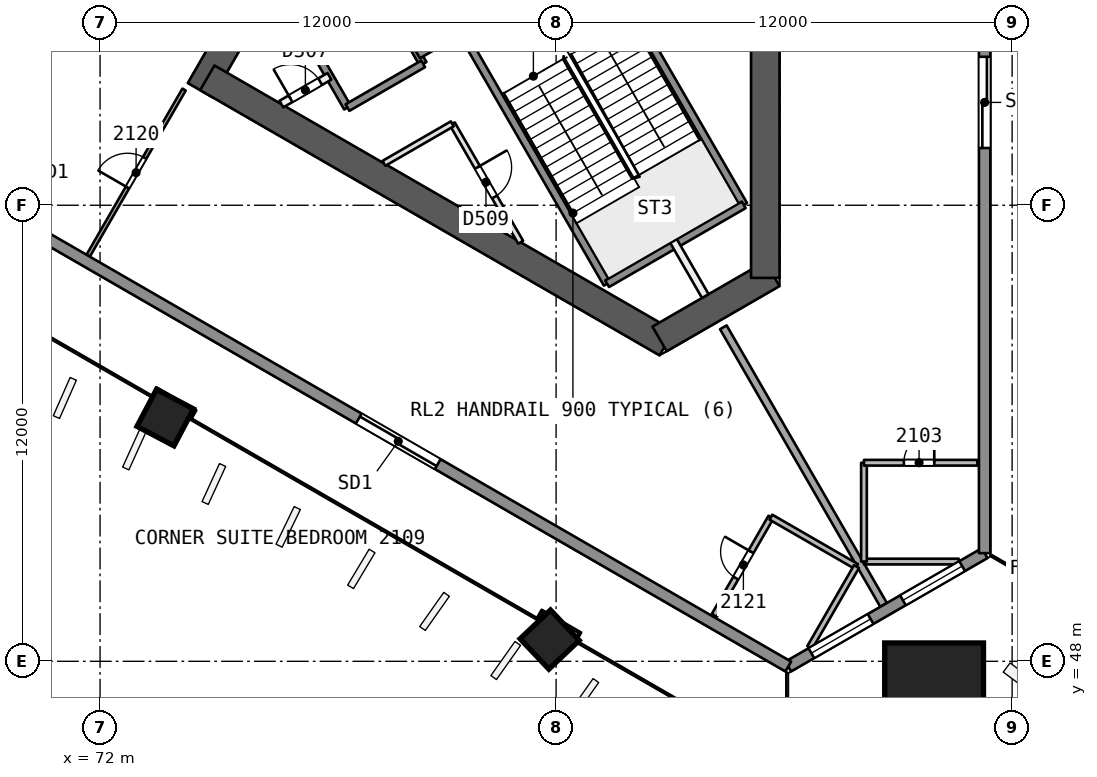
"""IFC4 building model, lengths in metres.
Left out: names, types, materials, properties, quantities, classifications, styles, units other than length and angle.
Written with IfcOpenShell. Run it as: python <this file> out.ifc"""

import sys

from ifc_helpers import new_model, si_unit, direction, frame, frame_2d, origin, origin_2d, place, context, subcontext, project, spatial, rectangle, extrude, element, fill, save


model = new_model("IFC4")
c1 = context("Model", 3, precision=1e-05, world=origin(), true_north=direction((0.0, 1.0)))
c2 = subcontext(c1, "Body", "Model", "MODEL_VIEW")
j1 = project(units=[si_unit("LENGTHUNIT", "METRE"), si_unit("PLANEANGLEUNIT", "RADIAN")], contexts=[c1])
p1 = place(None, origin())
s1 = spatial("IfcSite", under=j1, at=p1, CompositionType="ELEMENT")
p2 = place(p1, origin())
s2 = spatial("IfcBuilding", under=s1, at=p2, CompositionType="ELEMENT")
p3 = place(p2, frame((0.0, 0.0, 90.6)))
s3 = spatial("IfcBuildingStorey", under=s2, at=p3, CompositionType="ELEMENT", Elevation=90.6)
p4 = place(p3, frame((79.717, 71.831, 0.0), z_axis=(0.0, 0.0, 1.0), x_axis=(-0.499996230114, -0.866027580318, 0.0)))
e1 = element("IfcWall", 1, at=p4, inside=s3, PredefinedType="SHEAR", context=c2, shape_type="SweptSolid", body=[
    extrude(rectangle(XDim=10.164, YDim=0.75, at=frame_2d((5.082, 0.0))), origin(), (0.0, 0.0, 1.0), 3.7),
])
p5 = place(p4, frame((0.733, 0.0, 0.0)))
e2 = element("IfcOpeningElement", 2, at=p5, cuts=e1, PredefinedType="OPENING", context=c2, shape_type="SweptSolid", body=[
    extrude(rectangle(XDim=1.2, YDim=2.1, at=frame_2d((0.6, 1.05))), frame((0.0, 0.385, 0.0), z_axis=(0.0, -1.0, 0.0), x_axis=(1.0, 0.0, 0.0)), (0.0, 0.0, 1.0), 0.771),
])
p6 = place(p3, frame((74.822, 63.354, 0.0), z_axis=(0.0, 0.0, 1.0), x_axis=(0.8660248072, -0.500001033313, 0.0)))
e3 = element("IfcWall", 3, at=p6, inside=s3, PredefinedType="SHEAR", context=c2, shape_type="SweptSolid", body=[
    extrude(rectangle(XDim=13.958, YDim=0.75, at=frame_2d((6.979, 0.0))), origin(), (0.0, 0.0, 1.0), 3.7),
])
p7 = place(p3, frame((86.723, 56.483, 0.0), z_axis=(0.0, 0.0, 1.0), x_axis=(0.866017201164, 0.500014207086, 0.0)))
e4 = element("IfcWall", 4, at=p7, inside=s3, PredefinedType="SHEAR", context=c2, shape_type="SweptSolid", body=[
    extrude(rectangle(XDim=3.429, YDim=0.75, at=frame_2d((1.714, 0.0))), origin(), (0.0, 0.0, 1.0), 3.7),
])
p8 = place(p3, frame((89.505, 58.089, 0.0), z_axis=(0.0, 0.0, 1.0), x_axis=(0.0, 1.0, 0.0)))
e5 = element("IfcWall", 5, at=p8, inside=s3, PredefinedType="SHEAR", context=c2, shape_type="SweptSolid", body=[
    extrude(rectangle(XDim=14.117, YDim=0.75, at=frame_2d((7.059, 0.0))), origin(), (0.0, 0.0, 1.0), 3.7),
])
p9 = place(p3, frame((73.714, 54.385, 0.0), z_axis=(0.000857578916, 0.022824792675, 0.999739112668), x_axis=(-0.499949597911, -0.865818985073, 0.020196153983)))
e6 = element("IfcColumn", 6, at=p9, inside=s3, PredefinedType="COLUMN", context=c2, shape_type="SweptSolid", body=[
    extrude(rectangle(XDim=1.1, YDim=1.1, at=origin_2d()), origin(), (0.0, 0.0, 1.0), 3.701),
])
p10 = place(p3, frame((83.841, 48.538, 0.0), z_axis=(-0.008376454378, 0.028163354484, 0.999568237028), x_axis=(-0.500227515951, -0.8656583943, 0.02019843219)))
e7 = element("IfcColumn", 7, at=p10, inside=s3, PredefinedType="COLUMN", context=c2, shape_type="SweptSolid", body=[
    extrude(rectangle(XDim=1.1, YDim=1.1, at=origin_2d()), origin(), (0.0, 0.0, 1.0), 3.702),
])
p11 = place(p3, frame((93.968, 47.146, 0.0), z_axis=(-0.017607037296, 0.030466109479, 0.999380712447), x_axis=(-0.865809063816, -0.500374524745, 1.32655e-07)))
e8 = element("IfcColumn", 8, at=p11, inside=s3, PredefinedType="COLUMN", context=c2, shape_type="SweptSolid", body=[
    extrude(rectangle(XDim=2.6, YDim=2.6, at=origin_2d()), origin(), (0.0, 0.0, 1.0), 3.702),
])
p12 = place(p3, frame((94.595, 50.625, 0.0), z_axis=(0.0, 0.0, 1.0), x_axis=(-1.0, 0.0, 0.0)))
e9 = element("IfcWall", 9, at=p12, inside=s3, PredefinedType="PARTITIONING", context=c2, shape_type="SweptSolid", body=[
    extrude(rectangle(XDim=2.493, YDim=0.15, at=frame_2d((1.247, 0.0))), origin(), (0.0, 0.0, 1.0), 3.2),
])
p13 = place(p3, frame((92.102, 50.625, 0.0), z_axis=(0.0, 0.0, 1.0), x_axis=(0.0, 1.0, 0.0)))
e10 = element("IfcWall", 10, at=p13, inside=s3, PredefinedType="PARTITIONING", context=c2, shape_type="SweptSolid", body=[
    extrude(rectangle(XDim=2.6, YDim=0.15, at=frame_2d((1.3, 0.0))), origin(), (0.0, 0.0, 1.0), 3.2),
])
p14 = place(p3, frame((92.102, 53.225, 0.0), z_axis=(0.0, 0.0, 1.0), x_axis=(1.0, 0.0, 0.0)))
e11 = element("IfcWall", 11, at=p14, inside=s3, PredefinedType="PARTITIONING", context=c2, shape_type="SweptSolid", body=[
    extrude(rectangle(XDim=2.985, YDim=0.15, at=frame_2d((1.493, 0.0))), origin(), (0.0, 0.0, 1.0), 3.2),
])
p15 = place(p14, frame((1.05, 0.0, 0.0)))
e12 = element("IfcOpeningElement", 12, at=p15, cuts=e11, PredefinedType="OPENING", context=c2, shape_type="SweptSolid", body=[
    extrude(rectangle(XDim=0.8, YDim=2.1, at=frame_2d((0.4, 1.05))), frame((0.0, 0.085, 0.0), z_axis=(0.0, -1.0, 0.0), x_axis=(1.0, 0.0, 0.0)), (0.0, 0.0, 1.0), 0.171),
])
p16 = place(p3, frame((88.401, 56.789, 0.0), z_axis=(0.0, 0.0, 1.0), x_axis=(0.500002227119, -0.866024117953, 0.0)))
e13 = element("IfcWall", 13, at=p16, inside=s3, PredefinedType="PARTITIONING", context=c2, shape_type="SweptSolid", body=[
    extrude(rectangle(XDim=8.435, YDim=0.2, at=frame_2d((4.218, 0.0))), origin(), (0.0, 0.0, 1.0), 3.2),
])
for number, where, z_axis, x_axis in (
    (14, (64.936, 62.569, 0.0), (0.0, 0.0, 1.0), (0.5, 0.866, 0.0)),
    (15, (67.636, 61.01, 0.0), (0.0, 0.0, 1.0), (0.5, 0.866, 0.0)),
):
    element("IfcWall", number, at=place(p3, frame(where, z_axis=z_axis, x_axis=x_axis)), inside=s3, PredefinedType="PARTITIONING", context=c2, shape_type="SweptSolid", body=[
        extrude(rectangle(XDim=13.028, YDim=0.2, at=frame_2d((6.514, 0.0))), origin(), (0.0, 0.0, 1.0), 3.2),
    ])
p17 = place(p3, frame((71.686, 58.672, 0.0), z_axis=(0.0, 0.0, 1.0), x_axis=(0.49997221919, 0.866041442448, 0.0)))
e16 = element("IfcWall", 16, at=p17, inside=s3, PredefinedType="PARTITIONING", context=c2, shape_type="SweptSolid", body=[
    extrude(rectangle(XDim=5.049, YDim=0.1, at=frame_2d((2.524, 0.0))), origin(), (0.0, 0.0, 1.0), 3.2),
])
p18 = place(p17, frame((2.074, 0.0, 0.0)))
e17 = element("IfcOpeningElement", 17, at=p18, cuts=e16, PredefinedType="OPENING", context=c2, shape_type="SweptSolid", body=[
    extrude(rectangle(XDim=0.9, YDim=2.1, at=frame_2d((0.45, 1.05))), frame((0.0, 0.061, 0.0), z_axis=(0.0, -1.0, 0.0), x_axis=(1.0, 0.0, 0.0)), (0.0, 0.0, 1.0), 0.121),
])
p19 = place(p3, frame((88.161, 49.208, 0.0), z_axis=(0.0, 0.0, 1.0), x_axis=(0.500062282582, 0.865989441933, 0.0)))
e18 = element("IfcWall", 18, at=p19, inside=s3, PredefinedType="PARTITIONING", context=c2, shape_type="SweptSolid", body=[
    extrude(rectangle(XDim=2.985, YDim=0.15, at=frame_2d((1.492, 0.0))), origin(), (0.0, 0.0, 1.0), 3.2),
])
p20 = place(p19, frame((1.135, 0.0, 0.0)))
e19 = element("IfcOpeningElement", 19, at=p20, cuts=e18, PredefinedType="OPENING", context=c2, shape_type="SweptSolid", body=[
    extrude(rectangle(XDim=0.8, YDim=2.1, at=frame_2d((0.4, 1.05))), frame((0.0, 0.085, 0.0), z_axis=(0.0, -1.0, 0.0), x_axis=(1.0, 0.0, 0.0)), (0.0, 0.0, 1.0), 0.171),
])
p21 = place(p3, frame((89.654, 51.792, 0.0), z_axis=(0.0, 0.0, 1.0), x_axis=(0.865997922154, -0.500047596559, 0.0)))
e20 = element("IfcWall", 20, at=p21, inside=s3, PredefinedType="PARTITIONING", context=c2, shape_type="SweptSolid", body=[
    extrude(rectangle(XDim=2.6, YDim=0.15, at=frame_2d((1.3, 0.0))), origin(), (0.0, 0.0, 1.0), 3.2),
])
p22 = place(p3, frame((91.905, 50.492, 0.0), z_axis=(0.0, 0.0, 1.0), x_axis=(-0.499960120811, -0.86604842682, 0.0)))
e21 = element("IfcWall", 21, at=p22, inside=s3, PredefinedType="PARTITIONING", context=c2, shape_type="SweptSolid", body=[
    extrude(rectangle(XDim=2.46, YDim=0.15, at=frame_2d((1.23, 0.0))), origin(), (0.0, 0.0, 1.0), 3.2),
])
p23 = place(p3, frame((95.277, 50.846, 0.0), z_axis=(0.0, 0.0, 1.0), x_axis=(-0.866008413041, -0.500029427677, 0.0)))
e22 = element("IfcWall", 22, at=p23, inside=s3, PredefinedType="SOLIDWALL", context=c2, shape_type="SweptSolid", body=[
    extrude(rectangle(XDim=5.967, YDim=0.3, at=frame_2d((2.983, 0.0))), origin(), (0.0, 0.0, 1.0), 3.2),
])
p24 = place(p23, frame((0.682, 0.0, 0.9)))
e23 = element("IfcOpeningElement", 23, at=p24, cuts=e22, PredefinedType="OPENING", context=c2, shape_type="SweptSolid", body=[
    extrude(rectangle(XDim=1.8, YDim=1.5, at=frame_2d((0.9, 0.75))), frame((0.0, 0.161, 0.0), z_axis=(0.0, -1.0, 0.0), x_axis=(1.0, 0.0, 0.0)), (0.0, 0.0, 1.0), 0.321),
])
p25 = place(p23, frame((3.465, 0.0, 0.9)))
e24 = element("IfcOpeningElement", 24, at=p25, cuts=e22, PredefinedType="OPENING", context=c2, shape_type="SweptSolid", body=[
    extrude(rectangle(XDim=1.8, YDim=1.5, at=frame_2d((0.9, 0.75))), frame((0.0, 0.161, 0.0), z_axis=(0.0, -1.0, 0.0), x_axis=(1.0, 0.0, 0.0)), (0.0, 0.0, 1.0), 0.321),
])
p26 = place(p3, frame((95.277, 109.154, 0.0), z_axis=(0.0, 0.0, 1.0), x_axis=(0.0, -1.0, 0.0)))
e25 = element("IfcWall", 25, at=p26, inside=s3, PredefinedType="SOLIDWALL", context=c2, shape_type="SweptSolid", body=[
    extrude(rectangle(XDim=58.307, YDim=0.3, at=frame_2d((29.154, 0.0))), origin(), (0.0, 0.0, 1.0), 3.2),
])
p27 = place(p26, frame((27.954, 0.0, 0.0)))
e26 = element("IfcOpeningElement", 26, at=p27, cuts=e25, PredefinedType="OPENING", context=c2, shape_type="SweptSolid", body=[
    extrude(rectangle(XDim=2.4, YDim=2.4, at=frame_2d((1.2, 1.2))), frame((0.0, 0.161, 0.0), z_axis=(0.0, -1.0, 0.0), x_axis=(1.0, 0.0, 0.0)), (0.0, 0.0, 1.0), 0.321),
])
p28 = place(p26, frame((33.721, 0.0, 0.0)))
e27 = element("IfcOpeningElement", 27, at=p28, cuts=e25, PredefinedType="OPENING", context=c2, shape_type="SweptSolid", body=[
    extrude(rectangle(XDim=2.4, YDim=2.4, at=frame_2d((1.2, 1.2))), frame((0.0, 0.161, 0.0), z_axis=(0.0, -1.0, 0.0), x_axis=(1.0, 0.0, 0.0)), (0.0, 0.0, 1.0), 0.321),
])
p29 = place(p26, frame((45.247, 0.0, 0.0)))
e28 = element("IfcOpeningElement", 28, at=p29, cuts=e25, PredefinedType="OPENING", context=c2, shape_type="SweptSolid", body=[
    extrude(rectangle(XDim=2.4, YDim=2.4, at=frame_2d((1.2, 1.2))), frame((0.0, 0.161, 0.0), z_axis=(0.0, -1.0, 0.0), x_axis=(1.0, 0.0, 0.0)), (0.0, 0.0, 1.0), 0.321),
])
p30 = place(p26, frame((22.186, 0.0, 0.0)))
e29 = element("IfcOpeningElement", 29, at=p30, cuts=e25, PredefinedType="OPENING", context=c2, shape_type="SweptSolid", body=[
    extrude(rectangle(XDim=2.4, YDim=2.4, at=frame_2d((1.2, 1.2))), frame((0.0, 0.161, 0.0), z_axis=(0.0, -1.0, 0.0), x_axis=(1.0, 0.0, 0.0)), (0.0, 0.0, 1.0), 0.321),
])
p31 = place(p26, frame((10.65, 0.0, 0.0)))
e30 = element("IfcOpeningElement", 30, at=p31, cuts=e25, PredefinedType="OPENING", context=c2, shape_type="SweptSolid", body=[
    extrude(rectangle(XDim=2.4, YDim=2.4, at=frame_2d((1.2, 1.2))), frame((0.0, 0.161, 0.0), z_axis=(0.0, -1.0, 0.0), x_axis=(1.0, 0.0, 0.0)), (0.0, 0.0, 1.0), 0.321),
])
p32 = place(p3, frame((90.11, 47.863, 0.0), z_axis=(0.0, 0.0, 1.0), x_axis=(-0.866024236478, 0.500002021829, 0.0)))
e31 = element("IfcWall", 31, at=p32, inside=s3, PredefinedType="SOLIDWALL", context=c2, shape_type="SweptSolid", body=[
    extrude(rectangle(XDim=58.307, YDim=0.3, at=frame_2d((29.154, 0.0))), origin(), (0.0, 0.0, 1.0), 3.2),
])
p33 = place(p32, frame((44.133, 0.0, 0.0)))
e32 = element("IfcOpeningElement", 32, at=p33, cuts=e31, PredefinedType="OPENING", context=c2, shape_type="SweptSolid", body=[
    extrude(rectangle(XDim=2.4, YDim=2.4, at=frame_2d((1.2, 1.2))), frame((0.0, 0.161, 0.0), z_axis=(0.0, -1.0, 0.0), x_axis=(1.0, 0.0, 0.0)), (0.0, 0.0, 1.0), 0.321),
])
p34 = place(p32, frame((22.498, 0.0, 0.0)))
e33 = element("IfcOpeningElement", 33, at=p34, cuts=e31, PredefinedType="OPENING", context=c2, shape_type="SweptSolid", body=[
    extrude(rectangle(XDim=2.4, YDim=2.4, at=frame_2d((1.2, 1.2))), frame((0.0, 0.161, 0.0), z_axis=(0.0, -1.0, 0.0), x_axis=(1.0, 0.0, 0.0)), (0.0, 0.0, 1.0), 0.321),
])
p35 = place(p32, frame((10.65, 0.0, 0.0)))
e34 = element("IfcOpeningElement", 34, at=p35, cuts=e31, PredefinedType="OPENING", context=c2, shape_type="SweptSolid", body=[
    extrude(rectangle(XDim=2.4, YDim=2.4, at=frame_2d((1.2, 1.2))), frame((0.0, 0.161, 0.0), z_axis=(0.0, -1.0, 0.0), x_axis=(1.0, 0.0, 0.0)), (0.0, 0.0, 1.0), 0.321),
])
p36 = place(p32, frame((29.812, 0.0, 0.9)))
e35 = element("IfcOpeningElement", 35, at=p36, cuts=e31, PredefinedType="OPENING", context=c2, shape_type="SweptSolid", body=[
    extrude(rectangle(XDim=1.8, YDim=1.5, at=frame_2d((0.9, 0.75))), frame((0.0, 0.161, 0.0), z_axis=(0.0, -1.0, 0.0), x_axis=(1.0, 0.0, 0.0)), (0.0, 0.0, 1.0), 0.321),
])
p37 = place(p32, frame((26.695, 0.0, 0.9)))
e36 = element("IfcOpeningElement", 36, at=p37, cuts=e31, PredefinedType="OPENING", context=c2, shape_type="SweptSolid", body=[
    extrude(rectangle(XDim=1.8, YDim=1.5, at=frame_2d((0.9, 0.75))), frame((0.0, 0.161, 0.0), z_axis=(0.0, -1.0, 0.0), x_axis=(1.0, 0.0, 0.0)), (0.0, 0.0, 1.0), 0.321),
])
p38 = place(p3, frame((77.135, 64.952, 0.0), z_axis=(0.0, 0.0, 1.0), x_axis=(0.499996545922, -0.866027397988, 0.0)))
e37 = element("IfcWall", 37, at=p38, inside=s3, PredefinedType="SOLIDWALL", context=c2, shape_type="SweptSolid", body=[
    extrude(rectangle(XDim=2.75, YDim=0.2, at=frame_2d((1.375, 0.0))), origin(), (0.0, 0.0, 1.0), 3.2),
])
p39 = place(p3, frame((81.269, 62.142, 0.0), z_axis=(0.0, 0.0, 1.0), x_axis=(0.500043557135, -0.866000254601, 0.0)))
e38 = element("IfcWall", 38, at=p39, inside=s3, PredefinedType="PARTITIONING", context=c2, shape_type="SweptSolid", body=[
    extrude(rectangle(XDim=3.598, YDim=0.15, at=frame_2d((1.799, 0.0))), origin(), (0.0, 0.0, 1.0), 3.2),
])
p40 = place(p39, frame((1.322, 0.0, 0.0)))
e39 = element("IfcOpeningElement", 39, at=p40, cuts=e38, PredefinedType="OPENING", context=c2, shape_type="SweptSolid", body=[
    extrude(rectangle(XDim=0.9, YDim=2.1, at=frame_2d((0.45, 1.05))), frame((0.0, 0.085, 0.0), z_axis=(0.0, -1.0, 0.0), x_axis=(1.0, 0.0, 0.0)), (0.0, 0.0, 1.0), 0.171),
])
p41 = place(p3, frame((79.127, 66.102, 0.0), z_axis=(0.0, 0.0, 1.0), x_axis=(0.499996545922, -0.866027397988, 0.0)))
e40 = element("IfcWall", 40, at=p41, inside=s3, PredefinedType="SOLIDWALL", context=c2, shape_type="SweptSolid", body=[
    extrude(rectangle(XDim=2.75, YDim=0.2, at=frame_2d((1.375, 0.0))), origin(), (0.0, 0.0, 1.0), 3.2),
])
p42 = place(p3, frame((81.493, 64.604, 0.0), z_axis=(0.0, 0.0, 1.0), x_axis=(0.500006057782, -0.866021906294, 0.0)))
e41 = element("IfcWall", 41, at=p42, inside=s3, PredefinedType="SOLIDWALL", context=c2, shape_type="SweptSolid", body=[
    extrude(rectangle(XDim=7.7, YDim=0.2, at=frame_2d((3.85, 0.0))), origin(), (0.0, 0.0, 1.0), 3.2),
])
p43 = place(p3, frame((87.09, 59.06, 0.0), z_axis=(0.0, 0.0, 1.0), x_axis=(0.499937194881, -0.866061661301, 0.0)))
e42 = element("IfcWall", 42, at=p43, inside=s3, PredefinedType="PARTITIONING", context=c2, shape_type="SweptSolid", body=[
    extrude(rectangle(XDim=1.673, YDim=0.2, at=frame_2d((0.836, 0.0))), origin(), (0.0, 0.0, 1.0), 3.2),
])
p44 = place(p3, frame((85.087, 66.679, 0.0), z_axis=(0.0, 0.0, 1.0), x_axis=(0.500019787375, -0.866013979237, 0.0)))
e43 = element("IfcWall", 43, at=p44, inside=s3, PredefinedType="SOLIDWALL", context=c2, shape_type="SweptSolid", body=[
    extrude(rectangle(XDim=7.7, YDim=0.2, at=frame_2d((3.85, 0.0))), origin(), (0.0, 0.0, 1.0), 3.2),
])
p45 = place(p44, frame((0.55, 0.0, 0.0)))
e44 = element("IfcOpeningElement", 44, at=p45, cuts=e43, PredefinedType="OPENING", context=c2, shape_type="SweptSolid", body=[
    extrude(rectangle(XDim=1.1, YDim=2.1, at=frame_2d((0.55, 1.05))), frame((0.0, 0.11, 0.0), z_axis=(0.0, -1.0, 0.0), x_axis=(1.0, 0.0, 0.0)), (0.0, 0.0, 1.0), 0.221),
])
p46 = place(p3, frame((76.77, 62.662, 0.0), z_axis=(0.0, 0.0, 1.0), x_axis=(0.866054810376, 0.49994906283, 0.0)))
e45 = element("IfcWall", 45, at=p46, inside=s3, PredefinedType="PARTITIONING", context=c2, shape_type="SweptSolid", body=[
    extrude(rectangle(XDim=1.461, YDim=0.2, at=frame_2d((0.73, 0.0))), origin(), (0.0, 0.0, 1.0), 3.2),
])
p47 = place(p46, frame((0.281, 0.0, 0.0)))
e46 = element("IfcOpeningElement", 46, at=p47, cuts=e45, PredefinedType="OPENING", context=c2, shape_type="SweptSolid", body=[
    extrude(rectangle(XDim=0.9, YDim=2.1, at=frame_2d((0.45, 1.05))), frame((0.0, 0.11, 0.0), z_axis=(0.0, -1.0, 0.0), x_axis=(1.0, 0.0, 0.0)), (0.0, 0.0, 1.0), 0.221),
])
p48 = place(p3, frame((80.367, 63.954, 0.0), z_axis=(0.0, 0.0, 1.0), x_axis=(0.866026575979, 0.499997969693, 0.0)))
e47 = element("IfcWall", 47, at=p48, inside=s3, PredefinedType="SOLIDWALL", context=c2, shape_type="SweptSolid", body=[
    extrude(rectangle(XDim=6.75, YDim=0.2, at=frame_2d((3.375, 0.0))), origin(), (0.0, 0.0, 1.0), 3.2),
])
p49 = place(p3, frame((78.51, 62.57, 0.0), z_axis=(0.0, 0.0, 1.0), x_axis=(0.866053019151, 0.499952165731, 0.0)))
e48 = element("IfcWall", 48, at=p49, inside=s3, PredefinedType="SOLIDWALL", context=c2, shape_type="SweptSolid", body=[
    extrude(rectangle(XDim=2.3, YDim=0.2, at=frame_2d((1.15, 0.0))), origin(), (0.0, 0.0, 1.0), 3.2),
])
p50 = place(p3, frame((79.47, 61.103, 0.0), z_axis=(0.0, 0.0, 1.0), x_axis=(0.866021168401, 0.500007335828, 0.0)))
e49 = element("IfcWall", 49, at=p50, inside=s3, PredefinedType="PARTITIONING", context=c2, shape_type="SweptSolid", body=[
    extrude(rectangle(XDim=2.077, YDim=0.15, at=frame_2d((1.039, 0.0))), origin(), (0.0, 0.0, 1.0), 3.2),
])
p51 = place(p3, frame((85.343, 57.935, 0.0), z_axis=(0.0, 0.0, 1.0), x_axis=(0.866004344652, 0.500036473714, 0.0)))
e50 = element("IfcWall", 50, at=p51, inside=s3, PredefinedType="SOLIDWALL", context=c2, shape_type="SweptSolid", body=[
    extrude(rectangle(XDim=4.15, YDim=0.2, at=frame_2d((2.075, 0.0))), origin(), (0.0, 0.0, 1.0), 3.2),
])
p52 = place(p15, origin())
e51 = element("IfcDoor", 51, at=p52, inside=s3, OperationType="SINGLE_SWING_RIGHT", PredefinedType="NOTDEFINED", context=c2, shape_type="SweptSolid", body=[
    extrude(rectangle(XDim=0.8, YDim=2.1, at=frame_2d((0.4, 1.05))), frame((0.0, 0.025, 0.0), z_axis=(0.0, -1.0, 0.0), x_axis=(1.0, 0.0, 0.0)), (0.0, 0.0, 1.0), 0.05),
])
fill(e12, e51)
p53 = place(p18, origin())
e52 = element("IfcDoor", 52, at=p53, inside=s3, OperationType="SINGLE_SWING_LEFT", PredefinedType="NOTDEFINED", context=c2, shape_type="SweptSolid", body=[
    extrude(rectangle(XDim=0.9, YDim=2.1, at=frame_2d((0.45, 1.05))), frame((0.0, 0.025, 0.0), z_axis=(0.0, -1.0, 0.0), x_axis=(1.0, 0.0, 0.0)), (0.0, 0.0, 1.0), 0.05),
])
fill(e17, e52)
p54 = place(p20, origin())
e53 = element("IfcDoor", 53, at=p54, inside=s3, OperationType="SINGLE_SWING_RIGHT", PredefinedType="NOTDEFINED", context=c2, shape_type="SweptSolid", body=[
    extrude(rectangle(XDim=0.8, YDim=2.1, at=frame_2d((0.4, 1.05))), frame((0.0, 0.025, 0.0), z_axis=(0.0, -1.0, 0.0), x_axis=(1.0, 0.0, 0.0)), (0.0, 0.0, 1.0), 0.05),
])
fill(e19, e53)
p55 = place(p24, origin())
e54 = element("IfcWindow", 54, at=p55, inside=s3, PartitioningType="SINGLE_PANEL", PredefinedType="WINDOW", context=c2, shape_type="SweptSolid", body=[
    extrude(rectangle(XDim=1.8, YDim=1.5, at=frame_2d((0.9, 0.75))), frame((0.0, 0.03, 0.0), z_axis=(0.0, -1.0, 0.0), x_axis=(1.0, 0.0, 0.0)), (0.0, 0.0, 1.0), 0.06),
])
fill(e23, e54)
p56 = place(p25, origin())
e55 = element("IfcWindow", 55, at=p56, inside=s3, PartitioningType="SINGLE_PANEL", PredefinedType="WINDOW", context=c2, shape_type="SweptSolid", body=[
    extrude(rectangle(XDim=1.8, YDim=1.5, at=frame_2d((0.9, 0.75))), frame((0.0, 0.03, 0.0), z_axis=(0.0, -1.0, 0.0), x_axis=(1.0, 0.0, 0.0)), (0.0, 0.0, 1.0), 0.06),
])
fill(e24, e55)
p57 = place(p29, origin())
e56 = element("IfcDoor", 56, at=p57, inside=s3, OperationType="SLIDING_TO_LEFT", PredefinedType="NOTDEFINED", context=c2, shape_type="SweptSolid", body=[
    extrude(rectangle(XDim=2.4, YDim=2.4, at=frame_2d((1.2, 1.2))), frame((0.0, 0.025, 0.0), z_axis=(0.0, -1.0, 0.0), x_axis=(1.0, 0.0, 0.0)), (0.0, 0.0, 1.0), 0.05),
])
fill(e28, e56)
p58 = place(p35, origin())
e57 = element("IfcDoor", 57, at=p58, inside=s3, OperationType="SLIDING_TO_LEFT", PredefinedType="NOTDEFINED", context=c2, shape_type="SweptSolid", body=[
    extrude(rectangle(XDim=2.4, YDim=2.4, at=frame_2d((1.2, 1.2))), frame((0.0, 0.025, 0.0), z_axis=(0.0, -1.0, 0.0), x_axis=(1.0, 0.0, 0.0)), (0.0, 0.0, 1.0), 0.05),
])
fill(e34, e57)
p59 = place(p47, origin())
e58 = element("IfcDoor", 58, at=p59, inside=s3, OperationType="SINGLE_SWING_LEFT", PredefinedType="NOTDEFINED", context=c2, shape_type="SweptSolid", body=[
    extrude(rectangle(XDim=0.9, YDim=2.1, at=frame_2d((0.45, 1.05))), frame((0.0, 0.025, 0.0), z_axis=(0.0, -1.0, 0.0), x_axis=(1.0, 0.0, 0.0)), (0.0, 0.0, 1.0), 0.05),
])
fill(e46, e58)
p60 = place(p40, origin())
e59 = element("IfcDoor", 59, at=p60, inside=s3, OperationType="SINGLE_SWING_LEFT", PredefinedType="NOTDEFINED", context=c2, shape_type="SweptSolid", body=[
    extrude(rectangle(XDim=0.9, YDim=2.1, at=frame_2d((0.45, 1.05))), frame((0.0, 0.025, 0.0), z_axis=(0.0, -1.0, 0.0), x_axis=(1.0, 0.0, 0.0)), (0.0, 0.0, 1.0), 0.05),
])
fill(e39, e59)
save(model, sys.argv[1])
